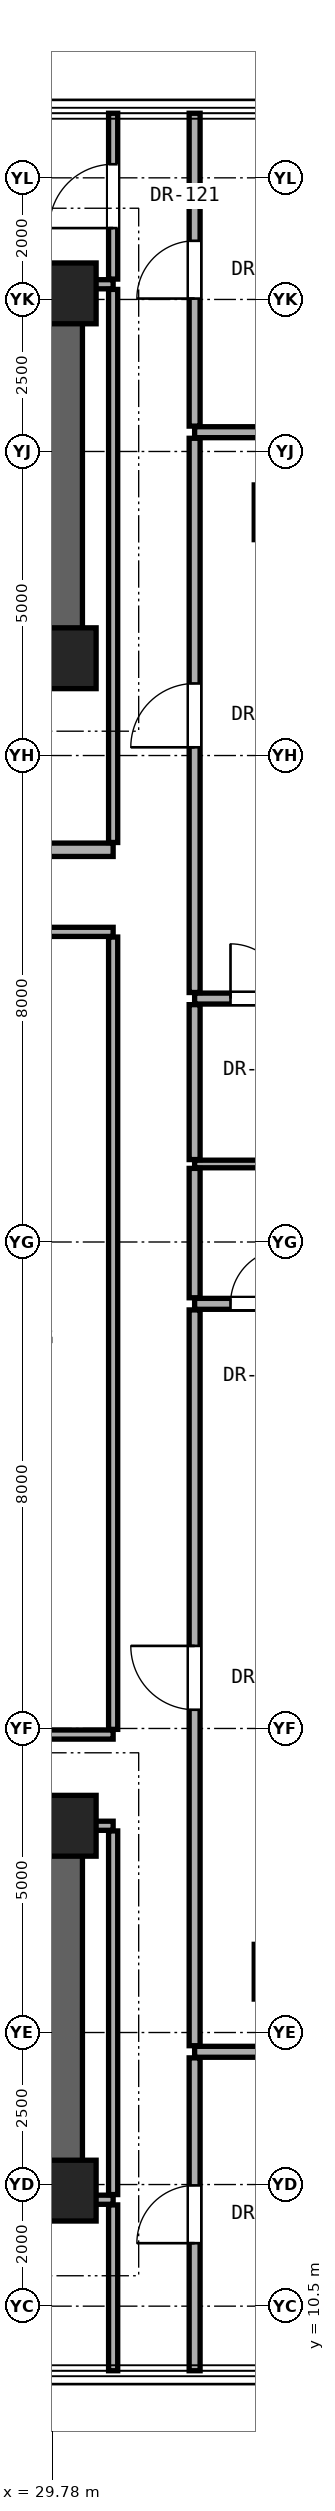
"""IFC4 building model, lengths in metres.
Left out: names, types, materials, properties, quantities, classifications, styles, units other than length and angle.
Written with IfcOpenShell. Run it as: python <this file> out.ifc"""

import sys

from ifc_helpers import new_model, si_unit, direction, frame, frame_2d, origin, origin_2d, place, context, subcontext, project, spatial, rectangle, extrude, element, fill, save


model = new_model("IFC4")
c1 = context("Model", 3, precision=1e-05, world=origin(), true_north=direction((0.0, 1.0)))
c2 = subcontext(c1, "Body", "Model", "MODEL_VIEW")
j1 = project(units=[si_unit("LENGTHUNIT", "METRE"), si_unit("PLANEANGLEUNIT", "RADIAN")], contexts=[c1])
p1 = place(None, origin())
s1 = spatial("IfcSite", under=j1, at=p1, CompositionType="ELEMENT")
p2 = place(p1, origin())
s2 = spatial("IfcBuilding", under=s1, at=p2, CompositionType="ELEMENT")
p3 = place(p2, frame((0.0, 0.0, 167.4)))
s3 = spatial("IfcBuildingStorey", under=s2, at=p3, CompositionType="ELEMENT", Elevation=167.4)
for number, where, z_axis, x_axis in (
    (1, (30.0, 12.4, 0.0), (0.0, 0.0, 1.0), (1.0, 0.0, 0.0)),
    (2, (30.0, 18.4, 0.0), (0.0, 0.0, 1.0), (1.0, 0.0, 0.0)),
    (3, (30.0, 37.6, 0.0), (0.0, 0.0, 1.0), (1.0, 0.0, 0.0)),
    (4, (30.0, 43.6, 0.0), (0.0, 0.0, 1.0), (1.0, 0.0, 0.0)),
):
    element("IfcColumn", number, at=place(p3, frame(where, z_axis=z_axis, x_axis=x_axis)), inside=s3, PredefinedType="COLUMN", context=c2, shape_type="SweptSolid", body=[
        extrude(rectangle(XDim=1.0, YDim=1.0, at=origin_2d()), origin(), (0.0, 0.0, 1.0), 3.25),
    ])
for number, where, z_axis, x_axis in (
    (5, (33.4, 16.0, 0.0), (0.0, 0.0, 1.0), (1.0, 0.0, 0.0)),
    (6, (33.4, 40.0, 0.0), (0.0, 0.0, 1.0), (1.0, 0.0, 0.0)),
):
    element("IfcColumn", number, at=place(p3, frame(where, z_axis=z_axis, x_axis=x_axis)), inside=s3, PredefinedType="PILASTER", context=c2, shape_type="SweptSolid", body=[
        extrude(rectangle(XDim=0.6, YDim=0.9, at=origin_2d()), origin(), (0.0, 0.0, 1.0), 3.25),
    ])
p4 = place(p3, frame((11.0, 43.6, 0.0), z_axis=(0.0, 0.0, 1.0), x_axis=(1.0, 0.0, 0.0)))
e7 = element("IfcWall", 7, at=p4, inside=s3, PredefinedType="SHEAR", context=c2, shape_type="SweptSolid", body=[
    extrude(rectangle(XDim=19.0, YDim=0.55, at=frame_2d((9.5, 0.0))), origin(), (0.0, 0.0, 1.0), 3.05),
])
p5 = place(p3, frame((30.0, 37.6, 0.0), z_axis=(0.0, 0.0, 1.0), x_axis=(0.0, 1.0, 0.0)))
e8 = element("IfcWall", 8, at=p5, inside=s3, PredefinedType="SHEAR", context=c2, shape_type="SweptSolid", body=[
    extrude(rectangle(XDim=6.0, YDim=0.55, at=frame_2d((3.0, 0.0))), origin(), (0.0, 0.0, 1.0), 3.05),
])
p6 = place(p3, frame((11.0, 37.6, 0.0), z_axis=(0.0, 0.0, 1.0), x_axis=(1.0, 0.0, 0.0)))
e9 = element("IfcWall", 9, at=p6, inside=s3, PredefinedType="SHEAR", context=c2, shape_type="SweptSolid", body=[
    extrude(rectangle(XDim=19.0, YDim=0.55, at=frame_2d((9.5, 0.0))), origin(), (0.0, 0.0, 1.0), 3.05),
])
p7 = place(p6, frame((1.06, 0.0, 0.0)))
e10 = element("IfcOpeningElement", 10, at=p7, cuts=e9, PredefinedType="OPENING", context=c2, shape_type="SweptSolid", body=[
    extrude(rectangle(XDim=1.15, YDim=2.2, at=frame_2d((0.575, 1.1))), frame((0.0, 0.285, 0.0), z_axis=(0.0, -1.0, 0.0), x_axis=(1.0, 0.0, 0.0)), (0.0, 0.0, 1.0), 0.57),
])
p8 = place(p6, frame((9.55, 0.0, 0.0)))
e11 = element("IfcOpeningElement", 11, at=p8, cuts=e9, PredefinedType="OPENING", context=c2, shape_type="SweptSolid", body=[
    extrude(rectangle(XDim=1.4, YDim=2.35, at=frame_2d((0.7, 1.175))), frame((0.0, 0.285, 0.0), z_axis=(0.0, -1.0, 0.0), x_axis=(1.0, 0.0, 0.0)), (0.0, 0.0, 1.0), 0.57),
])
p9 = place(p6, frame((11.95, 0.0, 0.0)))
e12 = element("IfcOpeningElement", 12, at=p9, cuts=e9, PredefinedType="OPENING", context=c2, shape_type="SweptSolid", body=[
    extrude(rectangle(XDim=1.4, YDim=2.35, at=frame_2d((0.7, 1.175))), frame((0.0, 0.285, 0.0), z_axis=(0.0, -1.0, 0.0), x_axis=(1.0, 0.0, 0.0)), (0.0, 0.0, 1.0), 0.57),
])
p10 = place(p3, frame((11.0, 12.4, 0.0), z_axis=(0.0, 0.0, 1.0), x_axis=(1.0, 0.0, 0.0)))
e13 = element("IfcWall", 13, at=p10, inside=s3, PredefinedType="SHEAR", context=c2, shape_type="SweptSolid", body=[
    extrude(rectangle(XDim=19.0, YDim=0.55, at=frame_2d((9.5, 0.0))), origin(), (0.0, 0.0, 1.0), 3.05),
])
p11 = place(p3, frame((30.0, 12.4, 0.0), z_axis=(0.0, 0.0, 1.0), x_axis=(0.0, 1.0, 0.0)))
e14 = element("IfcWall", 14, at=p11, inside=s3, PredefinedType="SHEAR", context=c2, shape_type="SweptSolid", body=[
    extrude(rectangle(XDim=6.0, YDim=0.55, at=frame_2d((3.0, 0.0))), origin(), (0.0, 0.0, 1.0), 3.05),
])
p12 = place(p3, frame((11.0, 18.4, 0.0), z_axis=(0.0, 0.0, 1.0), x_axis=(1.0, 0.0, 0.0)))
e15 = element("IfcWall", 15, at=p12, inside=s3, PredefinedType="SHEAR", context=c2, shape_type="SweptSolid", body=[
    extrude(rectangle(XDim=19.0, YDim=0.55, at=frame_2d((9.5, 0.0))), origin(), (0.0, 0.0, 1.0), 3.05),
])
p13 = place(p12, frame((4.175, 0.0, 0.0)))
e16 = element("IfcOpeningElement", 16, at=p13, cuts=e15, PredefinedType="OPENING", context=c2, shape_type="SweptSolid", body=[
    extrude(rectangle(XDim=1.2, YDim=2.25, at=frame_2d((0.6, 1.125))), frame((0.0, 0.285, 0.0), z_axis=(0.0, -1.0, 0.0), x_axis=(1.0, 0.0, 0.0)), (0.0, 0.0, 1.0), 0.57),
])
p14 = place(p12, frame((11.075, 0.0, 0.0)))
e17 = element("IfcOpeningElement", 17, at=p14, cuts=e15, PredefinedType="OPENING", context=c2, shape_type="SweptSolid", body=[
    extrude(rectangle(XDim=0.95, YDim=2.15, at=frame_2d((0.475, 1.075))), frame((0.0, 0.285, 0.0), z_axis=(0.0, -1.0, 0.0), x_axis=(1.0, 0.0, 0.0)), (0.0, 0.0, 1.0), 0.57),
])
p15 = place(p12, frame((14.3, 0.0, 0.0)))
e18 = element("IfcOpeningElement", 18, at=p15, cuts=e15, PredefinedType="OPENING", context=c2, shape_type="SweptSolid", body=[
    extrude(rectangle(XDim=1.3, YDim=2.3, at=frame_2d((0.65, 1.15))), frame((0.0, 0.285, 0.0), z_axis=(0.0, -1.0, 0.0), x_axis=(1.0, 0.0, 0.0)), (0.0, 0.0, 1.0), 0.57),
])
p16 = place(p12, frame((16.6, 0.0, 0.0)))
e19 = element("IfcOpeningElement", 19, at=p16, cuts=e15, PredefinedType="OPENING", context=c2, shape_type="SweptSolid", body=[
    extrude(rectangle(XDim=1.3, YDim=2.3, at=frame_2d((0.65, 1.15))), frame((0.0, 0.285, 0.0), z_axis=(0.0, -1.0, 0.0), x_axis=(1.0, 0.0, 0.0)), (0.0, 0.0, 1.0), 0.57),
])
p17 = place(p3, frame((30.27, 12.25, 0.0), z_axis=(0.0, 0.0, 1.0), x_axis=(1.0, 0.0, 0.0)))
e20 = element("IfcWall", 20, at=p17, inside=s3, PredefinedType="PARTITIONING", context=c2, shape_type="SweptSolid", body=[
    extrude(rectangle(XDim=0.51, YDim=0.15, at=frame_2d((0.255, 0.0))), origin(), (0.0, 0.0, 1.0), 3.05),
])
p18 = place(p3, frame((32.12, 14.683, 0.0), z_axis=(0.0, 0.0, 1.0), x_axis=(1.0, 0.0, 0.0)))
e21 = element("IfcWall", 21, at=p18, inside=s3, PredefinedType="PARTITIONING", context=c2, shape_type="SweptSolid", body=[
    extrude(rectangle(XDim=3.865, YDim=0.18, at=frame_2d((1.933, 0.0))), origin(), (0.0, 0.0, 1.0), 3.05),
])
p19 = place(p3, frame((30.27, 18.4, 0.0), z_axis=(0.0, 0.0, 1.0), x_axis=(1.0, 0.0, 0.0)))
e22 = element("IfcWall", 22, at=p19, inside=s3, PredefinedType="PARTITIONING", context=c2, shape_type="SweptSolid", body=[
    extrude(rectangle(XDim=0.51, YDim=0.15, at=frame_2d((0.255, 0.0))), origin(), (0.0, 0.0, 1.0), 2.442),
])
p20 = place(p3, frame((10.22, 19.9, 0.0), z_axis=(0.0, 0.0, 1.0), x_axis=(1.0, 0.0, 0.0)))
e23 = element("IfcWall", 23, at=p20, inside=s3, PredefinedType="PARTITIONING", context=c2, shape_type="SweptSolid", body=[
    extrude(rectangle(XDim=20.56, YDim=0.15, at=frame_2d((10.28, 0.0))), origin(), (0.0, 0.0, 1.0), 2.186),
])
p21 = place(p20, frame((1.66, 0.0, 0.0)))
e24 = element("IfcOpeningElement", 24, at=p21, cuts=e23, PredefinedType="OPENING", context=c2, shape_type="SweptSolid", body=[
    extrude(rectangle(XDim=0.9, YDim=2.1, at=frame_2d((0.45, 1.05))), frame((0.0, 0.085, 0.0), z_axis=(0.0, -1.0, 0.0), x_axis=(1.0, 0.0, 0.0)), (0.0, 0.0, 1.0), 0.17),
])
p22 = place(p20, frame((4.015, 0.0, 0.0)))
e25 = element("IfcOpeningElement", 25, at=p22, cuts=e23, PredefinedType="OPENING", context=c2, shape_type="SweptSolid", body=[
    extrude(rectangle(XDim=0.95, YDim=2.15, at=frame_2d((0.475, 1.075))), frame((0.0, 0.085, 0.0), z_axis=(0.0, -1.0, 0.0), x_axis=(1.0, 0.0, 0.0)), (0.0, 0.0, 1.0), 0.17),
])
p23 = place(p20, frame((7.905, 0.0, 0.0)))
e26 = element("IfcOpeningElement", 26, at=p23, cuts=e23, PredefinedType="OPENING", context=c2, shape_type="SweptSolid", body=[
    extrude(rectangle(XDim=0.85, YDim=2.01, at=frame_2d((0.425, 1.005))), frame((0.0, 0.085, 0.0), z_axis=(0.0, -1.0, 0.0), x_axis=(1.0, 0.0, 0.0)), (0.0, 0.0, 1.0), 0.17),
])
p24 = place(p3, frame((32.12, 26.983, 0.0), z_axis=(0.0, 0.0, 1.0), x_axis=(1.0, 0.0, 0.0)))
e27 = element("IfcWall", 27, at=p24, inside=s3, PredefinedType="PARTITIONING", context=c2, shape_type="SweptSolid", body=[
    extrude(rectangle(XDim=9.13, YDim=0.18, at=frame_2d((4.565, 0.0))), origin(), (0.0, 0.0, 1.0), 2.269),
])
p25 = place(p24, frame((5.09, 0.0, 0.0)))
e28 = element("IfcOpeningElement", 28, at=p25, cuts=e27, PredefinedType="OPENING", context=c2, shape_type="SweptSolid", body=[
    extrude(rectangle(XDim=0.95, YDim=2.15, at=frame_2d((0.475, 1.075))), frame((0.0, 0.1, 0.0), z_axis=(0.0, -1.0, 0.0), x_axis=(1.0, 0.0, 0.0)), (0.0, 0.0, 1.0), 0.2),
])
p26 = place(p24, frame((0.59, 0.0, 0.0)))
e29 = element("IfcOpeningElement", 29, at=p26, cuts=e27, PredefinedType="OPENING", context=c2, shape_type="SweptSolid", body=[
    extrude(rectangle(XDim=0.9, YDim=2.1, at=frame_2d((0.45, 1.05))), frame((0.0, 0.1, 0.0), z_axis=(0.0, -1.0, 0.0), x_axis=(1.0, 0.0, 0.0)), (0.0, 0.0, 1.0), 0.2),
])
p27 = place(p3, frame((32.12, 29.283, 0.0), z_axis=(0.0, 0.0, 1.0), x_axis=(1.0, 0.0, 0.0)))
e30 = element("IfcWall", 30, at=p27, inside=s3, PredefinedType="PARTITIONING", context=c2, shape_type="SweptSolid", body=[
    extrude(rectangle(XDim=9.13, YDim=0.125, at=frame_2d((4.565, 0.0))), origin(), (0.0, 0.0, 1.0), 2.269),
])
p28 = place(p3, frame((32.12, 32.003, 0.0), z_axis=(0.0, 0.0, 1.0), x_axis=(1.0, 0.0, 0.0)))
e31 = element("IfcWall", 31, at=p28, inside=s3, PredefinedType="PARTITIONING", context=c2, shape_type="SweptSolid", body=[
    extrude(rectangle(XDim=9.13, YDim=0.18, at=frame_2d((4.565, 0.0))), origin(), (0.0, 0.0, 1.0), 2.269),
])
p29 = place(p28, frame((5.09, 0.0, 0.0)))
e32 = element("IfcOpeningElement", 32, at=p29, cuts=e31, PredefinedType="OPENING", context=c2, shape_type="SweptSolid", body=[
    extrude(rectangle(XDim=0.95, YDim=2.15, at=frame_2d((0.475, 1.075))), frame((0.0, 0.1, 0.0), z_axis=(0.0, -1.0, 0.0), x_axis=(1.0, 0.0, 0.0)), (0.0, 0.0, 1.0), 0.2),
])
p30 = place(p28, frame((0.59, 0.0, 0.0)))
e33 = element("IfcOpeningElement", 33, at=p30, cuts=e31, PredefinedType="OPENING", context=c2, shape_type="SweptSolid", body=[
    extrude(rectangle(XDim=0.9, YDim=2.1, at=frame_2d((0.45, 1.05))), frame((0.0, 0.1, 0.0), z_axis=(0.0, -1.0, 0.0), x_axis=(1.0, 0.0, 0.0)), (0.0, 0.0, 1.0), 0.2),
])
p31 = place(p3, frame((10.22, 33.1, 0.0), z_axis=(0.0, 0.0, 1.0), x_axis=(1.0, 0.0, 0.0)))
e34 = element("IfcWall", 34, at=p31, inside=s3, PredefinedType="PARTITIONING", context=c2, shape_type="SweptSolid", body=[
    extrude(rectangle(XDim=20.56, YDim=0.15, at=frame_2d((10.28, 0.0))), origin(), (0.0, 0.0, 1.0), 2.186),
])
p32 = place(p31, frame((12.782, 0.0, 0.0)))
e35 = element("IfcOpeningElement", 35, at=p32, cuts=e34, PredefinedType="OPENING", context=c2, shape_type="SweptSolid", body=[
    extrude(rectangle(XDim=0.85, YDim=2.01, at=frame_2d((0.425, 1.005))), frame((0.0, 0.085, 0.0), z_axis=(0.0, -1.0, 0.0), x_axis=(1.0, 0.0, 0.0)), (0.0, 0.0, 1.0), 0.17),
])
p33 = place(p31, frame((17.712, 0.0, 0.0)))
e36 = element("IfcOpeningElement", 36, at=p33, cuts=e34, PredefinedType="OPENING", context=c2, shape_type="SweptSolid", body=[
    extrude(rectangle(XDim=0.85, YDim=2.01, at=frame_2d((0.425, 1.005))), frame((0.0, 0.085, 0.0), z_axis=(0.0, -1.0, 0.0), x_axis=(1.0, 0.0, 0.0)), (0.0, 0.0, 1.0), 0.17),
])
p34 = place(p3, frame((15.59, 34.45, 0.0), z_axis=(0.0, 0.0, 1.0), x_axis=(1.0, 0.0, 0.0)))
e37 = element("IfcWall", 37, at=p34, inside=s3, PredefinedType="SOLIDWALL", context=c2, shape_type="SweptSolid", body=[
    extrude(rectangle(XDim=15.19, YDim=0.22, at=frame_2d((7.595, 0.0))), origin(), (0.0, 0.0, 1.0), 2.186),
])
p35 = place(p34, frame((6.435, 0.0, 0.0)))
e38 = element("IfcOpeningElement", 38, at=p35, cuts=e37, PredefinedType="OPENING", context=c2, shape_type="SweptSolid", body=[
    extrude(rectangle(XDim=0.85, YDim=2.01, at=frame_2d((0.425, 1.005))), frame((0.0, 0.12, 0.0), z_axis=(0.0, -1.0, 0.0), x_axis=(1.0, 0.0, 0.0)), (0.0, 0.0, 1.0), 0.24),
])
p36 = place(p34, frame((11.085, 0.0, 0.0)))
e39 = element("IfcOpeningElement", 39, at=p36, cuts=e37, PredefinedType="OPENING", context=c2, shape_type="SweptSolid", body=[
    extrude(rectangle(XDim=0.95, YDim=2.15, at=frame_2d((0.475, 1.075))), frame((0.0, 0.12, 0.0), z_axis=(0.0, -1.0, 0.0), x_axis=(1.0, 0.0, 0.0)), (0.0, 0.0, 1.0), 0.24),
])
p37 = place(p34, frame((1.775, 0.0, 0.0)))
e40 = element("IfcOpeningElement", 40, at=p37, cuts=e37, PredefinedType="OPENING", context=c2, shape_type="SweptSolid", body=[
    extrude(rectangle(XDim=0.85, YDim=2.01, at=frame_2d((0.425, 1.005))), frame((0.0, 0.12, 0.0), z_axis=(0.0, -1.0, 0.0), x_axis=(1.0, 0.0, 0.0)), (0.0, 0.0, 1.0), 0.24),
])
p38 = place(p3, frame((32.12, 41.317, 0.0), z_axis=(0.0, 0.0, 1.0), x_axis=(1.0, 0.0, 0.0)))
e41 = element("IfcWall", 41, at=p38, inside=s3, PredefinedType="PARTITIONING", context=c2, shape_type="SweptSolid", body=[
    extrude(rectangle(XDim=3.865, YDim=0.18, at=frame_2d((1.933, 0.0))), origin(), (0.0, 0.0, 1.0), 3.05),
])
p39 = place(p3, frame((30.27, 43.75, 0.0), z_axis=(0.0, 0.0, 1.0), x_axis=(1.0, 0.0, 0.0)))
e42 = element("IfcWall", 42, at=p39, inside=s3, PredefinedType="PARTITIONING", context=c2, shape_type="SweptSolid", body=[
    extrude(rectangle(XDim=0.51, YDim=0.15, at=frame_2d((0.255, 0.0))), origin(), (0.0, 0.0, 1.0), 3.05),
])
p40 = place(p3, frame((30.78, 9.438, 0.0), z_axis=(0.0, 0.0, 1.0), x_axis=(0.0, 1.0, 0.0)))
e43 = element("IfcWall", 43, at=p40, inside=s3, PredefinedType="PARTITIONING", context=c2, shape_type="SweptSolid", body=[
    extrude(rectangle(XDim=2.727, YDim=0.15, at=frame_2d((1.364, 0.0))), origin(), (0.0, 0.0, 1.0), 3.05),
])
p41 = place(p3, frame((30.78, 12.335, 0.0), z_axis=(0.0, 0.0, 1.0), x_axis=(0.0, 1.0, 0.0)))
e44 = element("IfcWall", 44, at=p41, inside=s3, PredefinedType="PARTITIONING", context=c2, shape_type="SweptSolid", body=[
    extrude(rectangle(XDim=5.98, YDim=0.15, at=frame_2d((2.99, 0.0))), origin(), (0.0, 0.0, 1.0), 2.442),
])
p42 = place(p3, frame((30.78, 19.985, 0.0), z_axis=(0.0, 0.0, 1.0), x_axis=(0.0, 1.0, 0.0)))
e45 = element("IfcWall", 45, at=p42, inside=s3, PredefinedType="PARTITIONING", context=c2, shape_type="SweptSolid", body=[
    extrude(rectangle(XDim=13.03, YDim=0.15, at=frame_2d((6.515, 0.0))), origin(), (0.0, 0.0, 1.0), 2.346),
])
p43 = place(p3, frame((30.78, 34.57, 0.0), z_axis=(0.0, 0.0, 1.0), x_axis=(0.0, 1.0, 0.0)))
e46 = element("IfcWall", 46, at=p43, inside=s3, PredefinedType="PARTITIONING", context=c2, shape_type="SweptSolid", body=[
    extrude(rectangle(XDim=9.095, YDim=0.15, at=frame_2d((4.547, 0.0))), origin(), (0.0, 0.0, 1.0), 2.442),
])
p44 = place(p3, frame((30.78, 43.835, 0.0), z_axis=(0.0, 0.0, 1.0), x_axis=(0.0, 1.0, 0.0)))
e47 = element("IfcWall", 47, at=p44, inside=s3, PredefinedType="PARTITIONING", context=c2, shape_type="SweptSolid", body=[
    extrude(rectangle(XDim=2.727, YDim=0.15, at=frame_2d((1.364, 0.0))), origin(), (0.0, 0.0, 1.0), 3.05),
])
p45 = place(p44, frame((0.838, 0.0, 0.0)))
e48 = element("IfcOpeningElement", 48, at=p45, cuts=e47, PredefinedType="OPENING", context=c2, shape_type="SweptSolid", body=[
    extrude(rectangle(XDim=1.05, YDim=2.2, at=frame_2d((0.525, 1.1))), frame((0.0, 0.085, 0.0), z_axis=(0.0, -1.0, 0.0), x_axis=(1.0, 0.0, 0.0)), (0.0, 0.0, 1.0), 0.17),
])
p46 = place(p3, frame((32.12, 9.438, 0.0), z_axis=(0.0, 0.0, 1.0), x_axis=(0.0, 1.0, 0.0)))
e49 = element("IfcWall", 49, at=p46, inside=s3, PredefinedType="PARTITIONING", context=c2, shape_type="SweptSolid", body=[
    extrude(rectangle(XDim=5.145, YDim=0.18, at=frame_2d((2.573, 0.0))), origin(), (0.0, 0.0, 1.0), 3.05),
])
p47 = place(p46, frame((2.097, 0.0, 0.0)))
e50 = element("IfcOpeningElement", 50, at=p47, cuts=e49, PredefinedType="OPENING", context=c2, shape_type="SweptSolid", body=[
    extrude(rectangle(XDim=0.95, YDim=2.15, at=frame_2d((0.475, 1.075))), frame((0.0, 0.1, 0.0), z_axis=(0.0, -1.0, 0.0), x_axis=(1.0, 0.0, 0.0)), (0.0, 0.0, 1.0), 0.2),
])
p48 = place(p3, frame((32.12, 14.783, 0.0), z_axis=(0.0, 0.0, 1.0), x_axis=(0.0, 1.0, 0.0)))
e51 = element("IfcWall", 51, at=p48, inside=s3, PredefinedType="PARTITIONING", context=c2, shape_type="SweptSolid", body=[
    extrude(rectangle(XDim=12.1, YDim=0.18, at=frame_2d((6.05, 0.0))), origin(), (0.0, 0.0, 1.0), 2.346),
])
p49 = place(p48, frame((5.525, 0.0, 0.0)))
e52 = element("IfcOpeningElement", 52, at=p49, cuts=e51, PredefinedType="OPENING", context=c2, shape_type="SweptSolid", body=[
    extrude(rectangle(XDim=1.05, YDim=2.2, at=frame_2d((0.525, 1.1))), frame((0.0, 0.1, 0.0), z_axis=(0.0, -1.0, 0.0), x_axis=(1.0, 0.0, 0.0)), (0.0, 0.0, 1.0), 0.2),
])
p50 = place(p3, frame((32.12, 27.083, 0.0), z_axis=(0.0, 0.0, 1.0), x_axis=(0.0, 1.0, 0.0)))
e53 = element("IfcWall", 53, at=p50, inside=s3, PredefinedType="PARTITIONING", context=c2, shape_type="SweptSolid", body=[
    extrude(rectangle(XDim=2.127, YDim=0.18, at=frame_2d((1.064, 0.0))), origin(), (0.0, 0.0, 1.0), 3.05),
])
p51 = place(p3, frame((32.12, 29.355, 0.0), z_axis=(0.0, 0.0, 1.0), x_axis=(0.0, 1.0, 0.0)))
e54 = element("IfcWall", 54, at=p51, inside=s3, PredefinedType="PARTITIONING", context=c2, shape_type="SweptSolid", body=[
    extrude(rectangle(XDim=2.548, YDim=0.18, at=frame_2d((1.274, 0.0))), origin(), (0.0, 0.0, 1.0), 2.346),
])
p52 = place(p3, frame((32.12, 32.103, 0.0), z_axis=(0.0, 0.0, 1.0), x_axis=(0.0, 1.0, 0.0)))
e55 = element("IfcWall", 55, at=p52, inside=s3, PredefinedType="PARTITIONING", context=c2, shape_type="SweptSolid", body=[
    extrude(rectangle(XDim=9.114, YDim=0.18, at=frame_2d((4.557, 0.0))), origin(), (0.0, 0.0, 1.0), 2.442),
])
p53 = place(p52, frame((4.032, 0.0, 0.0)))
e56 = element("IfcOpeningElement", 56, at=p53, cuts=e55, PredefinedType="OPENING", context=c2, shape_type="SweptSolid", body=[
    extrude(rectangle(XDim=1.05, YDim=2.2, at=frame_2d((0.525, 1.1))), frame((0.0, 0.1, 0.0), z_axis=(0.0, -1.0, 0.0), x_axis=(1.0, 0.0, 0.0)), (0.0, 0.0, 1.0), 0.2),
])
p54 = place(p3, frame((32.12, 41.417, 0.0), z_axis=(0.0, 0.0, 1.0), x_axis=(0.0, 1.0, 0.0)))
e57 = element("IfcWall", 57, at=p54, inside=s3, PredefinedType="PARTITIONING", context=c2, shape_type="SweptSolid", body=[
    extrude(rectangle(XDim=5.145, YDim=0.18, at=frame_2d((2.573, 0.0))), origin(), (0.0, 0.0, 1.0), 3.05),
])
p55 = place(p54, frame((2.097, 0.0, 0.0)))
e58 = element("IfcOpeningElement", 58, at=p55, cuts=e57, PredefinedType="OPENING", context=c2, shape_type="SweptSolid", body=[
    extrude(rectangle(XDim=0.95, YDim=2.15, at=frame_2d((0.475, 1.075))), frame((0.0, 0.1, 0.0), z_axis=(0.0, -1.0, 0.0), x_axis=(1.0, 0.0, 0.0)), (0.0, 0.0, 1.0), 0.2),
])
p56 = place(p49, origin())
e59 = element("IfcDoor", 59, at=p56, inside=s3, OperationType="SINGLE_SWING_RIGHT", PredefinedType="DOOR", context=c2, shape_type="SweptSolid", body=[
    extrude(rectangle(XDim=1.05, YDim=2.2, at=frame_2d((0.525, 1.1))), frame((0.0, 0.025, 0.0), z_axis=(0.0, -1.0, 0.0), x_axis=(1.0, 0.0, 0.0)), (0.0, 0.0, 1.0), 0.05),
])
fill(e52, e59)
p57 = place(p26, origin())
e60 = element("IfcDoor", 60, at=p57, inside=s3, OperationType="SINGLE_SWING_RIGHT", PredefinedType="DOOR", context=c2, shape_type="SweptSolid", body=[
    extrude(rectangle(XDim=0.9, YDim=2.1, at=frame_2d((0.45, 1.05))), frame((0.0, 0.025, 0.0), z_axis=(0.0, -1.0, 0.0), x_axis=(1.0, 0.0, 0.0)), (0.0, 0.0, 1.0), 0.05),
])
fill(e29, e60)
p58 = place(p53, origin())
e61 = element("IfcDoor", 61, at=p58, inside=s3, OperationType="SINGLE_SWING_LEFT", PredefinedType="DOOR", context=c2, shape_type="SweptSolid", body=[
    extrude(rectangle(XDim=1.05, YDim=2.2, at=frame_2d((0.525, 1.1))), frame((0.0, 0.025, 0.0), z_axis=(0.0, -1.0, 0.0), x_axis=(1.0, 0.0, 0.0)), (0.0, 0.0, 1.0), 0.05),
])
fill(e56, e61)
p59 = place(p30, origin())
e62 = element("IfcDoor", 62, at=p59, inside=s3, OperationType="SINGLE_SWING_LEFT", PredefinedType="DOOR", context=c2, shape_type="SweptSolid", body=[
    extrude(rectangle(XDim=0.9, YDim=2.1, at=frame_2d((0.45, 1.05))), frame((0.0, 0.025, 0.0), z_axis=(0.0, -1.0, 0.0), x_axis=(1.0, 0.0, 0.0)), (0.0, 0.0, 1.0), 0.05),
])
fill(e33, e62)
p60 = place(p47, origin())
e63 = element("IfcDoor", 63, at=p60, inside=s3, OperationType="SINGLE_SWING_LEFT", PredefinedType="DOOR", context=c2, shape_type="SweptSolid", body=[
    extrude(rectangle(XDim=0.95, YDim=2.15, at=frame_2d((0.475, 1.075))), frame((0.0, 0.025, 0.0), z_axis=(0.0, -1.0, 0.0), x_axis=(1.0, 0.0, 0.0)), (0.0, 0.0, 1.0), 0.05),
])
fill(e50, e63)
p61 = place(p45, origin())
e64 = element("IfcDoor", 64, at=p61, inside=s3, OperationType="SINGLE_SWING_LEFT", PredefinedType="DOOR", context=c2, shape_type="SweptSolid", body=[
    extrude(rectangle(XDim=1.05, YDim=2.2, at=frame_2d((0.525, 1.1))), frame((0.0, 0.025, 0.0), z_axis=(0.0, -1.0, 0.0), x_axis=(1.0, 0.0, 0.0)), (0.0, 0.0, 1.0), 0.05),
])
fill(e48, e64)
p62 = place(p55, origin())
e65 = element("IfcDoor", 65, at=p62, inside=s3, OperationType="SINGLE_SWING_LEFT", PredefinedType="DOOR", context=c2, shape_type="SweptSolid", body=[
    extrude(rectangle(XDim=0.95, YDim=2.15, at=frame_2d((0.475, 1.075))), frame((0.0, 0.025, 0.0), z_axis=(0.0, -1.0, 0.0), x_axis=(1.0, 0.0, 0.0)), (0.0, 0.0, 1.0), 0.05),
])
fill(e58, e65)
save(model, sys.argv[1])
